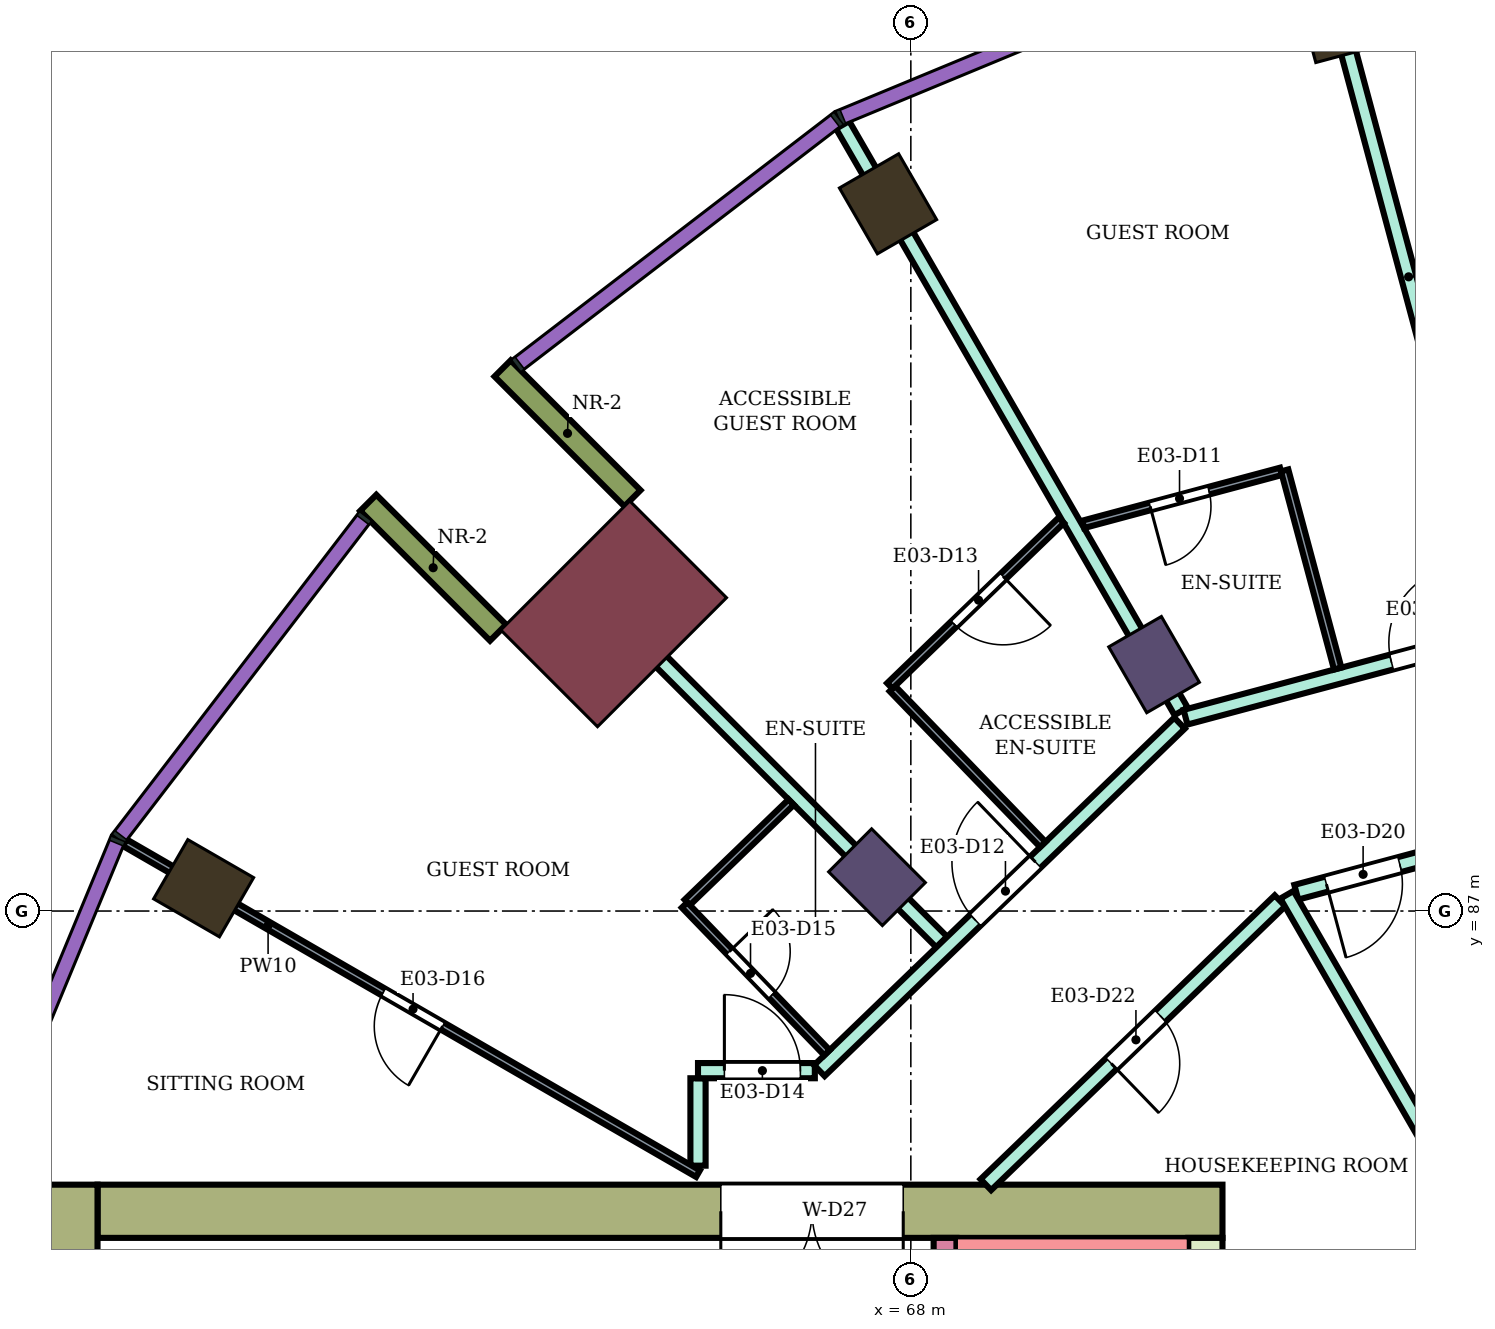
"""IFC4 building model, lengths in metres.
Left out: names, types, materials, properties, quantities, classifications, styles, units other than length and angle.
Written with IfcOpenShell. Run it as: python <this file> out.ifc"""

import sys

from ifc_helpers import new_model, si_unit, direction, frame, frame_2d, origin, origin_2d, place, context, subcontext, project, spatial, rectangle, extrude, element, fill, save


model = new_model("IFC4")
c1 = context("Model", 3, precision=1e-05, world=origin(), true_north=direction((0.0, 1.0)))
c2 = subcontext(c1, "Body", "Model", "MODEL_VIEW")
j1 = project(units=[si_unit("LENGTHUNIT", "METRE"), si_unit("PLANEANGLEUNIT", "RADIAN")], contexts=[c1])
p1 = place(None, origin())
s1 = spatial("IfcSite", under=j1, at=p1, CompositionType="ELEMENT")
p2 = place(p1, origin())
s2 = spatial("IfcBuilding", under=s1, at=p2, CompositionType="ELEMENT")
p3 = place(p2, frame((0.0, 0.0, 141.9)))
s3 = spatial("IfcBuildingStorey", under=s2, at=p3, CompositionType="ELEMENT", Elevation=141.9)
for number, where, z_axis, x_axis in (
    (1, (73.633, 98.762, 0.0), (0.0, 0.0, 1.0), (-0.259, 0.966, 0.0)),
    (2, (67.7, 96.304, 0.0), (0.0, 0.0, 1.0), (-0.5, 0.866, 0.0)),
    (3, (58.696, 87.3, 0.0), (0.0, 0.0, 1.0), (-0.866, 0.5, 0.0)),
):
    element("IfcColumn", number, at=place(p3, frame(where, z_axis=z_axis, x_axis=x_axis)), inside=s3, PredefinedType="COLUMN", context=c2, shape_type="SweptSolid", body=[
        extrude(rectangle(XDim=1.0, YDim=0.9, at=origin_2d()), origin(), (0.0, 0.0, 1.0), 3.9),
    ])
for number, where, z_axis, x_axis in (
    (4, (71.2, 90.242, 0.0), (0.0, 0.0, 1.0), (-0.5, 0.866, 0.0)),
    (5, (67.555, 87.445, 0.0), (0.0, 0.0, 1.0), (-0.707, 0.707, 0.0)),
):
    element("IfcColumn", number, at=place(p3, frame(where, z_axis=z_axis, x_axis=x_axis)), inside=s3, PredefinedType="COLUMN", context=c2, shape_type="SweptSolid", body=[
        extrude(rectangle(XDim=1.0, YDim=0.8, at=origin_2d()), origin(), (0.0, 0.0, 1.0), 3.9),
    ])
p4 = place(p3, frame((64.09, 90.91, 0.0), z_axis=(0.0, 0.0, 1.0), x_axis=(-0.707106781187, 0.707106781187, 0.0)))
e6 = element("IfcColumn", 6, at=p4, inside=s3, PredefinedType="COLUMN", context=c2, shape_type="SweptSolid", body=[
    extrude(rectangle(XDim=1.8, YDim=2.4, at=origin_2d()), origin(), (0.0, 0.0, 1.0), 3.9),
])
p5 = place(p3, frame((72.1, 83.05, 0.0), z_axis=(0.0, 0.0, 1.0), x_axis=(-1.0, 0.0, 0.0)))
e7 = element("IfcWall", 7, at=p5, inside=s3, PredefinedType="SHEAR", context=c2, shape_type="SweptSolid", body=[
    extrude(rectangle(XDim=14.8, YDim=0.7, at=frame_2d((7.4, 0.0))), origin(), (0.0, 0.0, 1.0), 3.58),
])
p6 = place(p5, frame((4.2, 0.0, 0.0)))
e8 = element("IfcOpeningElement", 8, at=p6, cuts=e7, PredefinedType="OPENING", context=c2, shape_type="SweptSolid", body=[
    extrude(rectangle(XDim=2.4, YDim=2.4, at=frame_2d((1.2, 1.2))), frame((0.0, 0.36, 0.0), z_axis=(0.0, -1.0, 0.0), x_axis=(1.0, 0.0, 0.0)), (0.0, 0.0, 1.0), 0.72),
])
p7 = place(p3, frame((71.875, 82.7, 0.0), z_axis=(0.0, 0.0, 1.0), x_axis=(0.0, -1.0, 0.0)))
e9 = element("IfcWall", 9, at=p7, inside=s3, PredefinedType="SHEAR", context=c2, shape_type="SweptSolid", body=[
    extrude(rectangle(XDim=7.7, YDim=0.45, at=frame_2d((3.85, 0.0))), origin(), (0.0, 0.0, 1.0), 3.58),
])
p8 = place(p3, frame((56.95, 83.4, 0.0), z_axis=(0.0, 0.0, 1.0), x_axis=(0.0, -1.0, 0.0)))
e10 = element("IfcWall", 10, at=p8, inside=s3, PredefinedType="SHEAR", context=c2, shape_type="SweptSolid", body=[
    extrude(rectangle(XDim=16.8, YDim=0.7, at=frame_2d((8.4, 0.0))), origin(), (0.0, 0.0, 1.0), 3.58),
])
p9 = place(p3, frame((68.45, 82.7, 0.0), z_axis=(0.0, 0.0, 1.0), x_axis=(0.0, -1.0, 0.0)))
e11 = element("IfcWall", 11, at=p9, inside=s3, PredefinedType="SHEAR", context=c2, shape_type="SweptSolid", body=[
    extrude(rectangle(XDim=7.7, YDim=0.3, at=frame_2d((3.85, 0.0))), origin(), (0.0, 0.0, 1.0), 3.58),
])
p10 = place(p9, frame((0.35, 0.0, 0.0)))
e12 = element("IfcOpeningElement", 12, at=p10, cuts=e11, PredefinedType="OPENING", context=c2, shape_type="SweptSolid", body=[
    extrude(rectangle(XDim=0.9, YDim=2.1, at=frame_2d((0.45, 1.05))), frame((0.0, 0.16, 0.0), z_axis=(0.0, -1.0, 0.0), x_axis=(1.0, 0.0, 0.0)), (0.0, 0.0, 1.0), 0.32),
])
for number, where, z_axis, x_axis in (
    (13, (64.338, 92.43, 0.0), (0.0, 0.0, 1.0), (-0.707, 0.707, 0.0)),
    (14, (62.57, 90.662, 0.0), (0.0, 0.0, 1.0), (-0.707, 0.707, 0.0)),
):
    element("IfcWall", number, at=place(p3, frame(where, z_axis=z_axis, x_axis=x_axis)), inside=s3, PredefinedType="NOTDEFINED", context=c2, shape_type="SweptSolid", body=[
        extrude(rectangle(XDim=2.416, YDim=0.3, at=frame_2d((1.208, 0.0))), origin(), (0.0, 0.0, 1.0), 3.9),
    ])
p11 = place(p3, frame((63.596, 91.406, 0.0), z_axis=(0.0, 0.0, 1.0), x_axis=(0.706963264491, -0.707250268759, 0.0)))
e15 = element("IfcWall", 15, at=p11, inside=s3, PredefinedType="PARTITIONING", context=c2, shape_type="SweptSolid", body=[
    extrude(rectangle(XDim=6.805, YDim=0.2, at=frame_2d((3.403, 0.0))), origin(), (0.0, 0.0, 1.0), 3.45),
])
p12 = place(p3, frame((65.2, 83.65, 0.0), z_axis=(0.0, 0.0, 1.0), x_axis=(0.0, 1.0, 0.0)))
e16 = element("IfcWall", 16, at=p12, inside=s3, PredefinedType="PARTITIONING", context=c2, shape_type="SweptSolid", body=[
    extrude(rectangle(XDim=1.15, YDim=0.2, at=frame_2d((0.575, 0.0))), origin(), (0.0, 0.0, 1.0), 3.45),
])
p13 = place(p3, frame((65.2, 84.9, 0.0), z_axis=(0.0, 0.0, 1.0), x_axis=(1.0, 0.0, 0.0)))
e17 = element("IfcWall", 17, at=p13, inside=s3, PredefinedType="PARTITIONING", context=c2, shape_type="SweptSolid", body=[
    extrude(rectangle(XDim=1.537, YDim=0.2, at=frame_2d((0.769, 0.0))), origin(), (0.0, 0.0, 1.0), 3.45),
])
p14 = place(p13, frame((0.347, 0.0, 0.0)))
e18 = element("IfcOpeningElement", 18, at=p14, cuts=e17, PredefinedType="OPENING", context=c2, shape_type="SweptSolid", body=[
    extrude(rectangle(XDim=1.0, YDim=2.1, at=frame_2d((0.5, 1.05))), frame((0.0, 0.11, 0.0), z_axis=(0.0, -1.0, 0.0), x_axis=(1.0, 0.0, 0.0)), (0.0, 0.0, 1.0), 0.22),
])
p15 = place(p3, frame((66.797, 84.9, 0.0), z_axis=(0.0, 0.0, 1.0), x_axis=(0.719692092412, 0.694293376116, 0.0)))
e19 = element("IfcWall", 19, at=p15, inside=s3, PredefinedType="PARTITIONING", context=c2, shape_type="SweptSolid", body=[
    extrude(rectangle(XDim=6.584, YDim=0.2, at=frame_2d((3.292, 0.0))), origin(), (0.0, 0.0, 1.0), 3.45),
])
p16 = place(p15, frame((2.852, 0.0, 0.0)))
e20 = element("IfcOpeningElement", 20, at=p16, cuts=e19, PredefinedType="OPENING", context=c2, shape_type="SweptSolid", body=[
    extrude(rectangle(XDim=1.1, YDim=2.1, at=frame_2d((0.55, 1.05))), frame((0.0, 0.11, 0.0), z_axis=(0.0, -1.0, 0.0), x_axis=(1.0, 0.0, 0.0)), (0.0, 0.0, 1.0), 0.22),
])
p17 = place(p3, frame((67.103, 97.342, 0.0), z_axis=(0.0, 0.0, 1.0), x_axis=(0.499900389553, -0.866082906265, 0.0)))
e21 = element("IfcWall", 21, at=p17, inside=s3, PredefinedType="PARTITIONING", context=c2, shape_type="SweptSolid", body=[
    extrude(rectangle(XDim=8.908, YDim=0.2, at=frame_2d((4.454, 0.0))), origin(), (0.0, 0.0, 1.0), 3.45),
])
p18 = place(p3, frame((68.987, 83.4, 0.0), z_axis=(0.0, 0.0, 1.0), x_axis=(0.719547721855, 0.694442996922, 0.0)))
e22 = element("IfcWall", 22, at=p18, inside=s3, PredefinedType="PARTITIONING", context=c2, shape_type="SweptSolid", body=[
    extrude(rectangle(XDim=5.378, YDim=0.2, at=frame_2d((2.689, 0.0))), origin(), (0.0, 0.0, 1.0), 3.45),
])
p19 = place(p18, frame((2.294, 0.0, 0.0)))
e23 = element("IfcOpeningElement", 23, at=p19, cuts=e22, PredefinedType="OPENING", context=c2, shape_type="SweptSolid", body=[
    extrude(rectangle(XDim=0.9, YDim=2.1, at=frame_2d((0.45, 1.05))), frame((0.0, 0.11, 0.0), z_axis=(0.0, -1.0, 0.0), x_axis=(1.0, 0.0, 0.0)), (0.0, 0.0, 1.0), 0.22),
])
p20 = place(p3, frame((71.614, 89.55, 0.0), z_axis=(0.0, 0.0, 1.0), x_axis=(0.965982156828, 0.258608725086, 0.0)))
e24 = element("IfcWall", 24, at=p20, inside=s3, PredefinedType="PARTITIONING", context=c2, shape_type="SweptSolid", body=[
    extrude(rectangle(XDim=8.592, YDim=0.2, at=frame_2d((4.296, 0.0))), origin(), (0.0, 0.0, 1.0), 3.45),
])
p21 = place(p20, frame((4.865, 0.0, 0.0)))
e25 = element("IfcOpeningElement", 25, at=p21, cuts=e24, PredefinedType="OPENING", context=c2, shape_type="SweptSolid", body=[
    extrude(rectangle(XDim=1.0, YDim=2.1, at=frame_2d((0.5, 1.05))), frame((0.0, 0.11, 0.0), z_axis=(0.0, -1.0, 0.0), x_axis=(1.0, 0.0, 0.0)), (0.0, 0.0, 1.0), 0.22),
])
p22 = place(p20, frame((2.804, 0.0, 0.0)))
e26 = element("IfcOpeningElement", 26, at=p22, cuts=e24, PredefinedType="OPENING", context=c2, shape_type="SweptSolid", body=[
    extrude(rectangle(XDim=1.0, YDim=2.1, at=frame_2d((0.5, 1.05))), frame((0.0, 0.11, 0.0), z_axis=(0.0, -1.0, 0.0), x_axis=(1.0, 0.0, 0.0)), (0.0, 0.0, 1.0), 0.22),
])
p23 = place(p3, frame((73.071, 87.247, 0.0), z_axis=(0.0, 0.0, 1.0), x_axis=(0.965931651205, 0.258797305243, 0.0)))
e27 = element("IfcWall", 27, at=p23, inside=s3, PredefinedType="PARTITIONING", context=c2, shape_type="SweptSolid", body=[
    extrude(rectangle(XDim=7.043, YDim=0.2, at=frame_2d((3.521, 0.0))), origin(), (0.0, 0.0, 1.0), 3.45),
])
p24 = place(p23, frame((0.41, 0.0, 0.0)))
e28 = element("IfcOpeningElement", 28, at=p24, cuts=e27, PredefinedType="OPENING", context=c2, shape_type="SweptSolid", body=[
    extrude(rectangle(XDim=1.0, YDim=2.1, at=frame_2d((0.5, 1.05))), frame((0.0, 0.11, 0.0), z_axis=(0.0, -1.0, 0.0), x_axis=(1.0, 0.0, 0.0)), (0.0, 0.0, 1.0), 0.22),
])
p25 = place(p3, frame((72.948, 87.214, 0.0), z_axis=(0.0, 0.0, 1.0), x_axis=(0.499898430755, -0.866084036875, 0.0)))
e29 = element("IfcWall", 29, at=p25, inside=s3, PredefinedType="PARTITIONING", context=c2, shape_type="SweptSolid", body=[
    extrude(rectangle(XDim=6.405, YDim=0.2, at=frame_2d((3.203, 0.0))), origin(), (0.0, 0.0, 1.0), 3.45),
])
p26 = place(p3, frame((73.323, 99.919, 0.0), z_axis=(0.0, 0.0, 1.0), x_axis=(0.258817230439, -0.965926312525, 0.0)))
e30 = element("IfcWall", 30, at=p26, inside=s3, PredefinedType="PARTITIONING", context=c2, shape_type="SweptSolid", body=[
    extrude(rectangle(XDim=9.474, YDim=0.2, at=frame_2d((4.737, 0.0))), origin(), (0.0, 0.0, 1.0), 3.45),
])
p27 = place(p3, frame((57.659, 87.899, 0.0), z_axis=(0.0, 0.0, 1.0), x_axis=(0.86602264145, -0.500004784474, 0.0)))
e31 = element("IfcWall", 31, at=p27, inside=s3, PredefinedType="PARTITIONING", context=c2, shape_type="SweptSolid", body=[
    extrude(rectangle(XDim=8.708, YDim=0.1, at=frame_2d((4.354, 0.0))), origin(), (0.0, 0.0, 1.0), 3.45),
])
p28 = place(p27, frame((3.929, 0.0, 0.0)))
e32 = element("IfcOpeningElement", 32, at=p28, cuts=e31, PredefinedType="OPENING", context=c2, shape_type="SweptSolid", body=[
    extrude(rectangle(XDim=0.9, YDim=2.1, at=frame_2d((0.45, 1.05))), frame((0.0, 0.06, 0.0), z_axis=(0.0, -1.0, 0.0), x_axis=(1.0, 0.0, 0.0)), (0.0, 0.0, 1.0), 0.12),
])
p29 = place(p3, frame((65.059, 87.114, 0.0), z_axis=(0.0, 0.0, 1.0), x_axis=(0.719653890619, 0.694332973232, 0.0)))
e33 = element("IfcWall", 33, at=p29, inside=s3, PredefinedType="PARTITIONING", context=c2, shape_type="SweptSolid", body=[
    extrude(rectangle(XDim=1.899, YDim=0.1, at=frame_2d((0.95, 0.0))), origin(), (0.0, 0.0, 1.0), 3.45),
])
p30 = place(p3, frame((65.023, 87.079, 0.0), z_axis=(0.0, 0.0, 1.0), x_axis=(0.694287838235, -0.719697434815, 0.0)))
e34 = element("IfcWall", 34, at=p30, inside=s3, PredefinedType="PARTITIONING", context=c2, shape_type="SweptSolid", body=[
    extrude(rectangle(XDim=2.7, YDim=0.1, at=frame_2d((1.35, 0.0))), origin(), (0.0, 0.0, 1.0), 3.45),
])
p31 = place(p30, frame((0.85, 0.0, 0.0)))
e35 = element("IfcOpeningElement", 35, at=p31, cuts=e34, PredefinedType="OPENING", context=c2, shape_type="SweptSolid", body=[
    extrude(rectangle(XDim=0.8, YDim=2.1, at=frame_2d((0.4, 1.05))), frame((0.0, 0.06, 0.0), z_axis=(0.0, -1.0, 0.0), x_axis=(1.0, 0.0, 0.0)), (0.0, 0.0, 1.0), 0.12),
])
p32 = place(p3, frame((67.758, 89.926, 0.0), z_axis=(0.0, 0.0, 1.0), x_axis=(0.694485934895, -0.719506279495, 0.0)))
e36 = element("IfcWall", 36, at=p32, inside=s3, PredefinedType="PARTITIONING", context=c2, shape_type="SweptSolid", body=[
    extrude(rectangle(XDim=2.849, YDim=0.1, at=frame_2d((1.425, 0.0))), origin(), (0.0, 0.0, 1.0), 3.45),
])
p33 = place(p3, frame((67.723, 89.962, 0.0), z_axis=(0.0, 0.0, 1.0), x_axis=(0.719487277563, 0.694505620873, 0.0)))
e37 = element("IfcWall", 37, at=p33, inside=s3, PredefinedType="PARTITIONING", context=c2, shape_type="SweptSolid", body=[
    extrude(rectangle(XDim=3.137, YDim=0.1, at=frame_2d((1.568, 0.0))), origin(), (0.0, 0.0, 1.0), 3.45),
])
p34 = place(p33, frame((1.173, 0.0, 0.0)))
e38 = element("IfcOpeningElement", 38, at=p34, cuts=e37, PredefinedType="OPENING", context=c2, shape_type="SweptSolid", body=[
    extrude(rectangle(XDim=0.9, YDim=2.1, at=frame_2d((0.45, 1.05))), frame((0.0, 0.06, 0.0), z_axis=(0.0, -1.0, 0.0), x_axis=(1.0, 0.0, 0.0)), (0.0, 0.0, 1.0), 0.12),
])
p35 = place(p3, frame((70.268, 92.087, 0.0), z_axis=(0.0, 0.0, 1.0), x_axis=(0.965937937835, 0.258773839966, 0.0)))
e39 = element("IfcWall", 39, at=p35, inside=s3, PredefinedType="PARTITIONING", context=c2, shape_type="SweptSolid", body=[
    extrude(rectangle(XDim=2.694, YDim=0.1, at=frame_2d((1.347, 0.0))), origin(), (0.0, 0.0, 1.0), 3.45),
])
p36 = place(p35, frame((0.912, 0.0, 0.0)))
e40 = element("IfcOpeningElement", 40, at=p36, cuts=e39, PredefinedType="OPENING", context=c2, shape_type="SweptSolid", body=[
    extrude(rectangle(XDim=0.8, YDim=2.1, at=frame_2d((0.4, 1.05))), frame((0.0, 0.06, 0.0), z_axis=(0.0, -1.0, 0.0), x_axis=(1.0, 0.0, 0.0)), (0.0, 0.0, 1.0), 0.12),
])
p37 = place(p3, frame((72.918, 92.797, 0.0), z_axis=(0.0, 0.0, 1.0), x_axis=(0.25867580527, -0.965964195904, 0.0)))
e41 = element("IfcWall", 41, at=p37, inside=s3, PredefinedType="PARTITIONING", context=c2, shape_type="SweptSolid", body=[
    extrude(rectangle(XDim=2.699, YDim=0.1, at=frame_2d((1.35, 0.0))), origin(), (0.0, 0.0, 1.0), 3.45),
])
p38 = place(p22, origin())
e42 = element("IfcDoor", 42, at=p38, inside=s3, OperationType="SINGLE_SWING_RIGHT", PredefinedType="DOOR", context=c2, shape_type="SweptSolid", body=[
    extrude(rectangle(XDim=1.0, YDim=2.1, at=frame_2d((0.5, 1.05))), frame((0.0, 0.025, 0.0), z_axis=(0.0, -1.0, 0.0), x_axis=(1.0, 0.0, 0.0)), (0.0, 0.0, 1.0), 0.05),
])
fill(e26, e42)
p39 = place(p36, frame((0.8, 0.0, 0.0), z_axis=(0.0, 0.0, 1.0), x_axis=(-1.0, 0.0, 0.0)))
e43 = element("IfcDoor", 43, at=p39, inside=s3, OperationType="SINGLE_SWING_RIGHT", PredefinedType="DOOR", context=c2, shape_type="SweptSolid", body=[
    extrude(rectangle(XDim=0.8, YDim=2.1, at=frame_2d((0.4, 1.05))), frame((0.0, 0.025, 0.0), z_axis=(0.0, -1.0, 0.0), x_axis=(1.0, 0.0, 0.0)), (0.0, 0.0, 1.0), 0.05),
])
fill(e40, e43)
p40 = place(p16, origin())
e44 = element("IfcDoor", 44, at=p40, inside=s3, OperationType="SINGLE_SWING_RIGHT", PredefinedType="DOOR", context=c2, shape_type="SweptSolid", body=[
    extrude(rectangle(XDim=1.1, YDim=2.1, at=frame_2d((0.55, 1.05))), frame((0.0, 0.025, 0.0), z_axis=(0.0, -1.0, 0.0), x_axis=(1.0, 0.0, 0.0)), (0.0, 0.0, 1.0), 0.05),
])
fill(e20, e44)
p41 = place(p34, frame((0.9, 0.0, 0.0), z_axis=(0.0, 0.0, 1.0), x_axis=(-1.0, 0.0, 0.0)))
e45 = element("IfcDoor", 45, at=p41, inside=s3, OperationType="SINGLE_SWING_LEFT", PredefinedType="DOOR", context=c2, shape_type="SweptSolid", body=[
    extrude(rectangle(XDim=0.9, YDim=2.1, at=frame_2d((0.45, 1.05))), frame((0.0, 0.025, 0.0), z_axis=(0.0, -1.0, 0.0), x_axis=(1.0, 0.0, 0.0)), (0.0, 0.0, 1.0), 0.05),
])
fill(e38, e45)
p42 = place(p14, origin())
e46 = element("IfcDoor", 46, at=p42, inside=s3, OperationType="SINGLE_SWING_LEFT", PredefinedType="DOOR", context=c2, shape_type="SweptSolid", body=[
    extrude(rectangle(XDim=1.0, YDim=2.1, at=frame_2d((0.5, 1.05))), frame((0.0, 0.025, 0.0), z_axis=(0.0, -1.0, 0.0), x_axis=(1.0, 0.0, 0.0)), (0.0, 0.0, 1.0), 0.05),
])
fill(e18, e46)
p43 = place(p31, origin())
e47 = element("IfcDoor", 47, at=p43, inside=s3, OperationType="SINGLE_SWING_LEFT", PredefinedType="DOOR", context=c2, shape_type="SweptSolid", body=[
    extrude(rectangle(XDim=0.8, YDim=2.1, at=frame_2d((0.4, 1.05))), frame((0.0, 0.025, 0.0), z_axis=(0.0, -1.0, 0.0), x_axis=(1.0, 0.0, 0.0)), (0.0, 0.0, 1.0), 0.05),
])
fill(e35, e47)
p44 = place(p28, frame((0.9, 0.0, 0.0), z_axis=(0.0, 0.0, 1.0), x_axis=(-1.0, 0.0, 0.0)))
e48 = element("IfcDoor", 48, at=p44, inside=s3, OperationType="SINGLE_SWING_LEFT", PredefinedType="DOOR", context=c2, shape_type="SweptSolid", body=[
    extrude(rectangle(XDim=0.9, YDim=2.1, at=frame_2d((0.45, 1.05))), frame((0.0, 0.025, 0.0), z_axis=(0.0, -1.0, 0.0), x_axis=(1.0, 0.0, 0.0)), (0.0, 0.0, 1.0), 0.05),
])
fill(e32, e48)
p45 = place(p24, frame((1.0, 0.0, 0.0), z_axis=(0.0, 0.0, 1.0), x_axis=(-1.0, 0.0, 0.0)))
e49 = element("IfcDoor", 49, at=p45, inside=s3, OperationType="SINGLE_SWING_RIGHT", PredefinedType="DOOR", context=c2, shape_type="SweptSolid", body=[
    extrude(rectangle(XDim=1.0, YDim=2.1, at=frame_2d((0.5, 1.05))), frame((0.0, 0.025, 0.0), z_axis=(0.0, -1.0, 0.0), x_axis=(1.0, 0.0, 0.0)), (0.0, 0.0, 1.0), 0.05),
])
fill(e28, e49)
p46 = place(p19, frame((0.9, 0.0, 0.0), z_axis=(0.0, 0.0, 1.0), x_axis=(-1.0, 0.0, 0.0)))
e50 = element("IfcDoor", 50, at=p46, inside=s3, OperationType="SINGLE_SWING_RIGHT", PredefinedType="DOOR", context=c2, shape_type="SweptSolid", body=[
    extrude(rectangle(XDim=0.9, YDim=2.1, at=frame_2d((0.45, 1.05))), frame((0.0, 0.025, 0.0), z_axis=(0.0, -1.0, 0.0), x_axis=(1.0, 0.0, 0.0)), (0.0, 0.0, 1.0), 0.05),
])
fill(e23, e50)
p47 = place(p6, origin())
e51 = element("IfcDoor", 51, at=p47, inside=s3, OperationType="DOUBLE_DOOR_SINGLE_SWING", PredefinedType="DOOR", context=c2, shape_type="SweptSolid", body=[
    extrude(rectangle(XDim=2.4, YDim=2.4, at=frame_2d((1.2, 1.2))), frame((0.0, 0.025, 0.0), z_axis=(0.0, -1.0, 0.0), x_axis=(1.0, 0.0, 0.0)), (0.0, 0.0, 1.0), 0.05),
])
fill(e8, e51)
save(model, sys.argv[1])
